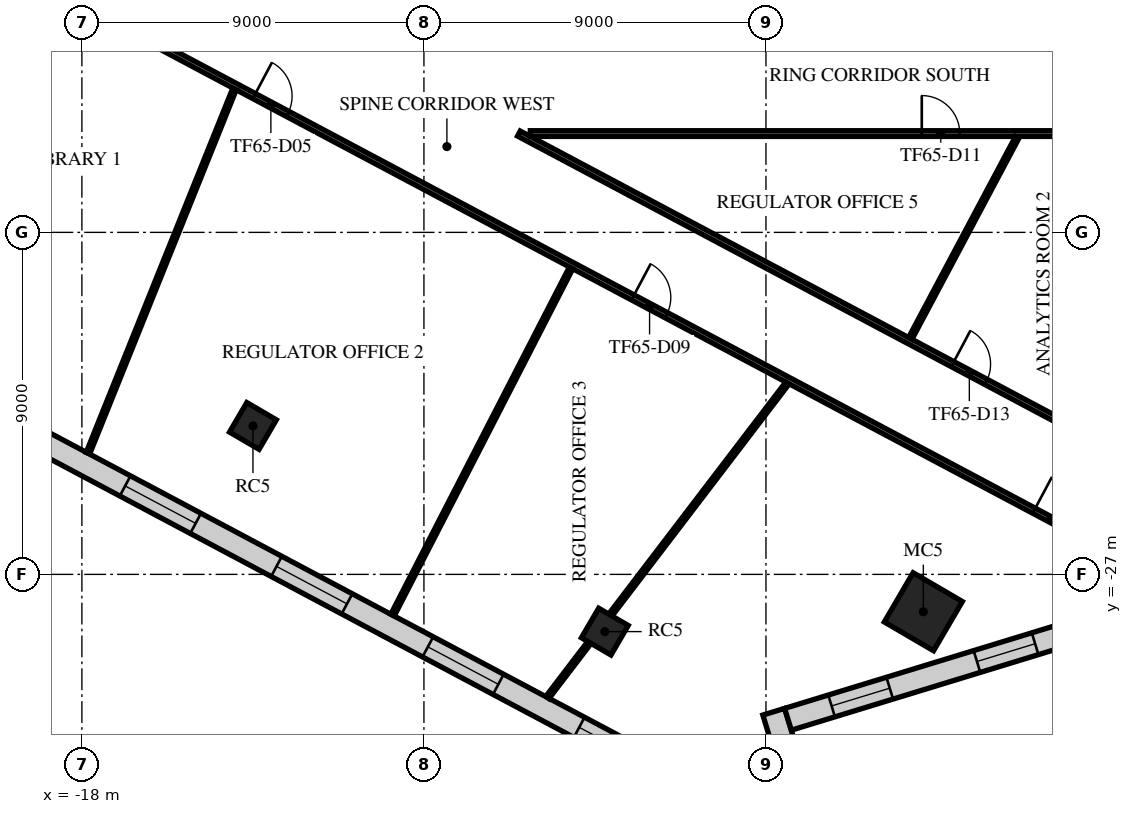
"""IFC4 building model, lengths in metres.
Left out: names, types, materials, properties, quantities, classifications, styles, units other than length and angle.
Written with IfcOpenShell. Run it as: python <this file> out.ifc"""

import sys

from ifc_helpers import new_model, si_unit, direction, frame, frame_2d, origin, origin_2d, place, context, subcontext, project, spatial, rectangle, extrude, element, fill, save


model = new_model("IFC4")
c1 = context("Model", 3, precision=1e-05, world=origin(), true_north=direction((0.0, 1.0)))
c2 = subcontext(c1, "Body", "Model", "MODEL_VIEW")
j1 = project(units=[si_unit("LENGTHUNIT", "METRE"), si_unit("PLANEANGLEUNIT", "RADIAN")], contexts=[c1])
p1 = place(None, origin())
s1 = spatial("IfcSite", under=j1, at=p1, CompositionType="ELEMENT")
p2 = place(p1, origin())
s2 = spatial("IfcBuilding", under=s1, at=p2, CompositionType="ELEMENT")
p3 = place(p2, frame((0.0, 0.0, 274.9)))
s3 = spatial("IfcBuildingStorey", under=s2, at=p3, CompositionType="ELEMENT", Elevation=274.9)
for number, where, z_axis, x_axis in (
    (1, (-13.499, -23.094, 0.0), (0.0, 0.0, 1.0), (0.505, 0.863, 0.0)),
    (2, (-4.24, -28.506, 0.0), (0.0, 0.0, 1.0), (0.505, 0.863, 0.0)),
):
    element("IfcColumn", number, at=place(p3, frame(where, z_axis=z_axis, x_axis=x_axis)), inside=s3, PredefinedType="COLUMN", context=c2, shape_type="SweptSolid", body=[
        extrude(rectangle(XDim=0.9, YDim=0.9, at=origin_2d()), origin(), (0.0, 0.0, 1.0), 4.0),
    ])
p4 = place(p3, frame((4.141, -27.983, 0.0), z_axis=(0.0, 0.0, 1.0), x_axis=(0.504643651291, 0.863327739165, 0.0)))
e3 = element("IfcColumn", 3, at=p4, inside=s3, PredefinedType="COLUMN", context=c2, shape_type="SweptSolid", body=[
    extrude(rectangle(XDim=1.5, YDim=1.5, at=origin_2d()), origin(), (0.0, 0.0, 1.0), 4.0),
])
p5 = place(p3, frame((-29.875, -17.753, 0.0), z_axis=(0.0, 0.0, 1.0), x_axis=(0.882945726539, -0.469475072806, 0.0)))
e4 = element("IfcWall", 4, at=p5, inside=s3, PredefinedType="STANDARD", context=c2, shape_type="SweptSolid", body=[
    extrude(rectangle(XDim=36.086, YDim=0.6, at=frame_2d((18.043, 0.0))), origin(), (0.0, 0.0, 1.0), 3.64),
])
p6 = place(p5, frame((1.205, 0.0, 0.9)))
e5 = element("IfcOpeningElement", 5, at=p6, cuts=e4, PredefinedType="OPENING", context=c2, shape_type="SweptSolid", body=[
    extrude(rectangle(XDim=2.1, YDim=2.1, at=frame_2d((1.05, 1.05))), frame((0.0, 0.31, 0.0), z_axis=(0.0, -1.0, 0.0), x_axis=(1.0, 0.0, 0.0)), (0.0, 0.0, 1.0), 0.62),
])
p7 = place(p5, frame((5.716, 0.0, 0.9)))
e6 = element("IfcOpeningElement", 6, at=p7, cuts=e4, PredefinedType="OPENING", context=c2, shape_type="SweptSolid", body=[
    extrude(rectangle(XDim=2.1, YDim=2.1, at=frame_2d((1.05, 1.05))), frame((0.0, 0.31, 0.0), z_axis=(0.0, -1.0, 0.0), x_axis=(1.0, 0.0, 0.0)), (0.0, 0.0, 1.0), 0.62),
])
p8 = place(p5, frame((10.227, 0.0, 0.9)))
e7 = element("IfcOpeningElement", 7, at=p8, cuts=e4, PredefinedType="OPENING", context=c2, shape_type="SweptSolid", body=[
    extrude(rectangle(XDim=2.1, YDim=2.1, at=frame_2d((1.05, 1.05))), frame((0.0, 0.31, 0.0), z_axis=(0.0, -1.0, 0.0), x_axis=(1.0, 0.0, 0.0)), (0.0, 0.0, 1.0), 0.62),
])
p9 = place(p5, frame((14.738, 0.0, 0.9)))
e8 = element("IfcOpeningElement", 8, at=p9, cuts=e4, PredefinedType="OPENING", context=c2, shape_type="SweptSolid", body=[
    extrude(rectangle(XDim=2.1, YDim=2.1, at=frame_2d((1.05, 1.05))), frame((0.0, 0.31, 0.0), z_axis=(0.0, -1.0, 0.0), x_axis=(1.0, 0.0, 0.0)), (0.0, 0.0, 1.0), 0.62),
])
p10 = place(p5, frame((19.249, 0.0, 0.9)))
e9 = element("IfcOpeningElement", 9, at=p10, cuts=e4, PredefinedType="OPENING", context=c2, shape_type="SweptSolid", body=[
    extrude(rectangle(XDim=2.1, YDim=2.1, at=frame_2d((1.05, 1.05))), frame((0.0, 0.31, 0.0), z_axis=(0.0, -1.0, 0.0), x_axis=(1.0, 0.0, 0.0)), (0.0, 0.0, 1.0), 0.62),
])
p11 = place(p5, frame((23.759, 0.0, 0.9)))
e10 = element("IfcOpeningElement", 10, at=p11, cuts=e4, PredefinedType="OPENING", context=c2, shape_type="SweptSolid", body=[
    extrude(rectangle(XDim=2.1, YDim=2.1, at=frame_2d((1.05, 1.05))), frame((0.0, 0.31, 0.0), z_axis=(0.0, -1.0, 0.0), x_axis=(1.0, 0.0, 0.0)), (0.0, 0.0, 1.0), 0.62),
])
p12 = place(p5, frame((28.27, 0.0, 0.9)))
e11 = element("IfcOpeningElement", 11, at=p12, cuts=e4, PredefinedType="OPENING", context=c2, shape_type="SweptSolid", body=[
    extrude(rectangle(XDim=2.1, YDim=2.1, at=frame_2d((1.05, 1.05))), frame((0.0, 0.31, 0.0), z_axis=(0.0, -1.0, 0.0), x_axis=(1.0, 0.0, 0.0)), (0.0, 0.0, 1.0), 0.62),
])
p13 = place(p5, frame((32.781, 0.0, 0.9)))
e12 = element("IfcOpeningElement", 12, at=p13, cuts=e4, PredefinedType="OPENING", context=c2, shape_type="SweptSolid", body=[
    extrude(rectangle(XDim=2.1, YDim=2.1, at=frame_2d((1.05, 1.05))), frame((0.0, 0.31, 0.0), z_axis=(0.0, -1.0, 0.0), x_axis=(1.0, 0.0, 0.0)), (0.0, 0.0, 1.0), 0.62),
])
p14 = place(p3, frame((1.56, -35.047, 0.0), z_axis=(0.0, 0.0, 1.0), x_axis=(-0.2923643842, 0.956306994041, 0.0)))
e13 = element("IfcWall", 13, at=p14, inside=s3, PredefinedType="STANDARD", context=c2, shape_type="SweptSolid", body=[
    extrude(rectangle(XDim=4.635, YDim=0.6, at=frame_2d((2.318, 0.0))), origin(), (0.0, 0.0, 1.0), 3.64),
])
p15 = place(p14, frame((1.218, 0.0, 0.9)))
e14 = element("IfcOpeningElement", 14, at=p15, cuts=e13, PredefinedType="OPENING", context=c2, shape_type="SweptSolid", body=[
    extrude(rectangle(XDim=1.6, YDim=2.1, at=frame_2d((0.8, 1.05))), frame((0.0, 0.31, 0.0), z_axis=(0.0, -1.0, 0.0), x_axis=(1.0, 0.0, 0.0)), (0.0, 0.0, 1.0), 0.62),
])
p16 = place(p3, frame((0.579, -30.813, 0.0), z_axis=(0.0, 0.0, 1.0), x_axis=(0.95631057801, 0.292352660987, 0.0)))
e15 = element("IfcWall", 15, at=p16, inside=s3, PredefinedType="STANDARD", context=c2, shape_type="SweptSolid", body=[
    extrude(rectangle(XDim=8.0, YDim=0.6, at=frame_2d((4.0, 0.0))), origin(), (0.0, 0.0, 1.0), 3.64),
])
p17 = place(p16, frame((1.2, 0.0, 0.9)))
e16 = element("IfcOpeningElement", 16, at=p17, cuts=e15, PredefinedType="OPENING", context=c2, shape_type="SweptSolid", body=[
    extrude(rectangle(XDim=1.6, YDim=2.1, at=frame_2d((0.8, 1.05))), frame((0.0, 0.31, 0.0), z_axis=(0.0, -1.0, 0.0), x_axis=(1.0, 0.0, 0.0)), (0.0, 0.0, 1.0), 0.62),
])
p18 = place(p16, frame((5.2, 0.0, 0.9)))
e17 = element("IfcOpeningElement", 17, at=p18, cuts=e15, PredefinedType="OPENING", context=c2, shape_type="SweptSolid", body=[
    extrude(rectangle(XDim=1.6, YDim=2.1, at=frame_2d((0.8, 1.05))), frame((0.0, 0.31, 0.0), z_axis=(0.0, -1.0, 0.0), x_axis=(1.0, 0.0, 0.0)), (0.0, 0.0, 1.0), 0.62),
])
p19 = place(p3, frame((-26.271, -7.606, 0.0), z_axis=(0.0, 0.0, 1.0), x_axis=(0.882946860375, -0.469472940385, 0.0)))
e18 = element("IfcWall", 18, at=p19, inside=s3, PredefinedType="PARTITIONING", context=c2, shape_type="SweptSolid", body=[
    extrude(rectangle(XDim=39.325, YDim=0.15, at=frame_2d((19.662, 0.0))), origin(), (0.0, 0.0, 1.0), 3.04),
])
p20 = place(p19, frame((2.8, 0.0, 0.0)))
e19 = element("IfcOpeningElement", 19, at=p20, cuts=e18, PredefinedType="OPENING", context=c2, shape_type="SweptSolid", body=[
    extrude(rectangle(XDim=1.0, YDim=2.1, at=frame_2d((0.5, 1.05))), frame((0.0, 0.085, 0.0), z_axis=(0.0, -1.0, 0.0), x_axis=(1.0, 0.0, 0.0)), (0.0, 0.0, 1.0), 0.17),
])
p21 = place(p19, frame((6.915, 0.0, 0.0)))
e20 = element("IfcOpeningElement", 20, at=p21, cuts=e18, PredefinedType="OPENING", context=c2, shape_type="SweptSolid", body=[
    extrude(rectangle(XDim=1.0, YDim=2.1, at=frame_2d((0.5, 1.05))), frame((0.0, 0.085, 0.0), z_axis=(0.0, -1.0, 0.0), x_axis=(1.0, 0.0, 0.0)), (0.0, 0.0, 1.0), 0.17),
])
p22 = place(p19, frame((14.499, 0.0, 0.0)))
e21 = element("IfcOpeningElement", 21, at=p22, cuts=e18, PredefinedType="OPENING", context=c2, shape_type="SweptSolid", body=[
    extrude(rectangle(XDim=1.0, YDim=2.1, at=frame_2d((0.5, 1.05))), frame((0.0, 0.085, 0.0), z_axis=(0.0, -1.0, 0.0), x_axis=(1.0, 0.0, 0.0)), (0.0, 0.0, 1.0), 0.17),
])
p23 = place(p19, frame((25.785, 0.0, 0.0)))
e22 = element("IfcOpeningElement", 22, at=p23, cuts=e18, PredefinedType="OPENING", context=c2, shape_type="SweptSolid", body=[
    extrude(rectangle(XDim=1.0, YDim=2.1, at=frame_2d((0.5, 1.05))), frame((0.0, 0.085, 0.0), z_axis=(0.0, -1.0, 0.0), x_axis=(1.0, 0.0, 0.0)), (0.0, 0.0, 1.0), 0.17),
])
p24 = place(p19, frame((37.741, 0.0, 0.0)))
e23 = element("IfcOpeningElement", 23, at=p24, cuts=e18, PredefinedType="OPENING", context=c2, shape_type="SweptSolid", body=[
    extrude(rectangle(XDim=1.0, YDim=2.1, at=frame_2d((0.5, 1.05))), frame((0.0, 0.085, 0.0), z_axis=(0.0, -1.0, 0.0), x_axis=(1.0, 0.0, 0.0)), (0.0, 0.0, 1.0), 0.17),
])
p25 = place(p3, frame((-6.501, -15.4, 0.0), z_axis=(0.0, 0.0, 1.0), x_axis=(0.882952324659, -0.469462663456, 0.0)))
e24 = element("IfcWall", 24, at=p25, inside=s3, PredefinedType="PARTITIONING", context=c2, shape_type="SweptSolid", body=[
    extrude(rectangle(XDim=18.21, YDim=0.15, at=frame_2d((9.105, 0.0))), origin(), (0.0, 0.0, 1.0), 3.04),
])
p26 = place(p25, frame((12.924, 0.0, 0.0)))
e25 = element("IfcOpeningElement", 25, at=p26, cuts=e24, PredefinedType="OPENING", context=c2, shape_type="SweptSolid", body=[
    extrude(rectangle(XDim=1.0, YDim=2.1, at=frame_2d((0.5, 1.05))), frame((0.0, 0.085, 0.0), z_axis=(0.0, -1.0, 0.0), x_axis=(1.0, 0.0, 0.0)), (0.0, 0.0, 1.0), 0.17),
])
p27 = place(p3, frame((-6.2, -15.4, 0.0), z_axis=(0.0, 0.0, 1.0), x_axis=(1.0, 0.0, 0.0)))
e26 = element("IfcWall", 26, at=p27, inside=s3, PredefinedType="PARTITIONING", context=c2, shape_type="SweptSolid", body=[
    extrude(rectangle(XDim=21.6, YDim=0.15, at=frame_2d((10.8, 0.0))), origin(), (0.0, 0.0, 1.0), 3.24),
])
p28 = place(p27, frame((10.3, 0.0, 0.0)))
e27 = element("IfcOpeningElement", 27, at=p28, cuts=e26, PredefinedType="OPENING", context=c2, shape_type="SweptSolid", body=[
    extrude(rectangle(XDim=1.0, YDim=2.1, at=frame_2d((0.5, 1.05))), frame((0.0, 0.085, 0.0), z_axis=(0.0, -1.0, 0.0), x_axis=(1.0, 0.0, 0.0)), (0.0, 0.0, 1.0), 0.17),
])
p29 = place(p3, frame((-17.84, -23.81, 0.0), z_axis=(0.0, 0.0, 1.0), x_axis=(0.373322071297, 0.927701800732, 0.0)))
e28 = element("IfcWall", 28, at=p29, inside=s3, PredefinedType="PARTITIONING", context=c2, shape_type="SweptSolid", body=[
    extrude(rectangle(XDim=10.326, YDim=0.1, at=frame_2d((5.163, 0.0))), origin(), (0.0, 0.0, 1.0), 3.04),
])
p30 = place(p3, frame((-9.826, -28.071, 0.0), z_axis=(0.0, 0.0, 1.0), x_axis=(0.457289483917, 0.889317900359, 0.0)))
e29 = element("IfcWall", 29, at=p30, inside=s3, PredefinedType="PARTITIONING", context=c2, shape_type="SweptSolid", body=[
    extrude(rectangle(XDim=10.274, YDim=0.1, at=frame_2d((5.137, 0.0))), origin(), (0.0, 0.0, 1.0), 3.04),
])
p31 = place(p3, frame((-5.75, -30.238, 0.0), z_axis=(0.0, 0.0, 1.0), x_axis=(0.60662872898, 0.794985273559, 0.0)))
e30 = element("IfcWall", 30, at=p31, inside=s3, PredefinedType="PARTITIONING", context=c2, shape_type="SweptSolid", body=[
    extrude(rectangle(XDim=1.821, YDim=0.1, at=frame_2d((0.911, 0.0))), origin(), (0.0, 0.0, 1.0), 3.64),
])
p32 = place(p3, frame((-4.095, -28.07, 0.0), z_axis=(0.0, 0.0, 1.0), x_axis=(0.606675434914, 0.794949631532, 0.0)))
e31 = element("IfcWall", 31, at=p32, inside=s3, PredefinedType="PARTITIONING", context=c2, shape_type="SweptSolid", body=[
    extrude(rectangle(XDim=7.677, YDim=0.1, at=frame_2d((3.838, 0.0))), origin(), (0.0, 0.0, 1.0), 3.24),
])
p33 = place(p3, frame((3.797, -20.791, 0.0), z_axis=(0.0, 0.0, 1.0), x_axis=(0.469539343426, 0.882911549916, 0.0)))
e32 = element("IfcWall", 32, at=p33, inside=s3, PredefinedType="PARTITIONING", context=c2, shape_type="SweptSolid", body=[
    extrude(rectangle(XDim=5.994, YDim=0.1, at=frame_2d((2.997, 0.0))), origin(), (0.0, 0.0, 1.0), 3.24),
])
p34 = place(p9, origin())
e33 = element("IfcWindow", 33, at=p34, inside=s3, PartitioningType="SINGLE_PANEL", PredefinedType="WINDOW", context=c2, shape_type="SweptSolid", body=[
    extrude(rectangle(XDim=2.1, YDim=2.1, at=frame_2d((1.05, 1.05))), frame((0.0, 0.03, 0.0), z_axis=(0.0, -1.0, 0.0), x_axis=(1.0, 0.0, 0.0)), (0.0, 0.0, 1.0), 0.06),
])
fill(e8, e33)
p35 = place(p10, origin())
e34 = element("IfcWindow", 34, at=p35, inside=s3, PartitioningType="SINGLE_PANEL", PredefinedType="WINDOW", context=c2, shape_type="SweptSolid", body=[
    extrude(rectangle(XDim=2.1, YDim=2.1, at=frame_2d((1.05, 1.05))), frame((0.0, 0.03, 0.0), z_axis=(0.0, -1.0, 0.0), x_axis=(1.0, 0.0, 0.0)), (0.0, 0.0, 1.0), 0.06),
])
fill(e9, e34)
p36 = place(p11, origin())
e35 = element("IfcWindow", 35, at=p36, inside=s3, PartitioningType="SINGLE_PANEL", PredefinedType="WINDOW", context=c2, shape_type="SweptSolid", body=[
    extrude(rectangle(XDim=2.1, YDim=2.1, at=frame_2d((1.05, 1.05))), frame((0.0, 0.03, 0.0), z_axis=(0.0, -1.0, 0.0), x_axis=(1.0, 0.0, 0.0)), (0.0, 0.0, 1.0), 0.06),
])
fill(e10, e35)
p37 = place(p12, origin())
e36 = element("IfcWindow", 36, at=p37, inside=s3, PartitioningType="SINGLE_PANEL", PredefinedType="WINDOW", context=c2, shape_type="SweptSolid", body=[
    extrude(rectangle(XDim=2.1, YDim=2.1, at=frame_2d((1.05, 1.05))), frame((0.0, 0.03, 0.0), z_axis=(0.0, -1.0, 0.0), x_axis=(1.0, 0.0, 0.0)), (0.0, 0.0, 1.0), 0.06),
])
fill(e11, e36)
p38 = place(p17, origin())
e37 = element("IfcWindow", 37, at=p38, inside=s3, PartitioningType="SINGLE_PANEL", PredefinedType="WINDOW", context=c2, shape_type="SweptSolid", body=[
    extrude(rectangle(XDim=1.6, YDim=2.1, at=frame_2d((0.8, 1.05))), frame((0.0, 0.03, 0.0), z_axis=(0.0, -1.0, 0.0), x_axis=(1.0, 0.0, 0.0)), (0.0, 0.0, 1.0), 0.06),
])
fill(e16, e37)
p39 = place(p18, origin())
e38 = element("IfcWindow", 38, at=p39, inside=s3, PartitioningType="SINGLE_PANEL", PredefinedType="WINDOW", context=c2, shape_type="SweptSolid", body=[
    extrude(rectangle(XDim=1.6, YDim=2.1, at=frame_2d((0.8, 1.05))), frame((0.0, 0.03, 0.0), z_axis=(0.0, -1.0, 0.0), x_axis=(1.0, 0.0, 0.0)), (0.0, 0.0, 1.0), 0.06),
])
fill(e17, e38)
p40 = place(p22, frame((1.0, 0.0, 0.0), z_axis=(0.0, 0.0, 1.0), x_axis=(-1.0, 0.0, 0.0)))
e39 = element("IfcDoor", 39, at=p40, inside=s3, OperationType="SINGLE_SWING_RIGHT", PredefinedType="DOOR", context=c2, shape_type="SweptSolid", body=[
    extrude(rectangle(XDim=1.0, YDim=2.1, at=frame_2d((0.5, 1.05))), frame((0.0, 0.025, 0.0), z_axis=(0.0, -1.0, 0.0), x_axis=(1.0, 0.0, 0.0)), (0.0, 0.0, 1.0), 0.05),
])
fill(e21, e39)
p41 = place(p23, frame((1.0, 0.0, 0.0), z_axis=(0.0, 0.0, 1.0), x_axis=(-1.0, 0.0, 0.0)))
e40 = element("IfcDoor", 40, at=p41, inside=s3, OperationType="SINGLE_SWING_LEFT", PredefinedType="DOOR", context=c2, shape_type="SweptSolid", body=[
    extrude(rectangle(XDim=1.0, YDim=2.1, at=frame_2d((0.5, 1.05))), frame((0.0, 0.025, 0.0), z_axis=(0.0, -1.0, 0.0), x_axis=(1.0, 0.0, 0.0)), (0.0, 0.0, 1.0), 0.05),
])
fill(e22, e40)
p42 = place(p28, frame((1.0, 0.0, 0.0), z_axis=(0.0, 0.0, 1.0), x_axis=(-1.0, 0.0, 0.0)))
e41 = element("IfcDoor", 41, at=p42, inside=s3, OperationType="SINGLE_SWING_LEFT", PredefinedType="DOOR", context=c2, shape_type="SweptSolid", body=[
    extrude(rectangle(XDim=1.0, YDim=2.1, at=frame_2d((0.5, 1.05))), frame((0.0, 0.025, 0.0), z_axis=(0.0, -1.0, 0.0), x_axis=(1.0, 0.0, 0.0)), (0.0, 0.0, 1.0), 0.05),
])
fill(e27, e41)
p43 = place(p26, origin())
e42 = element("IfcDoor", 42, at=p43, inside=s3, OperationType="SINGLE_SWING_RIGHT", PredefinedType="DOOR", context=c2, shape_type="SweptSolid", body=[
    extrude(rectangle(XDim=1.0, YDim=2.1, at=frame_2d((0.5, 1.05))), frame((0.0, 0.025, 0.0), z_axis=(0.0, -1.0, 0.0), x_axis=(1.0, 0.0, 0.0)), (0.0, 0.0, 1.0), 0.05),
])
fill(e25, e42)
p44 = place(p24, frame((1.0, 0.0, 0.0), z_axis=(0.0, 0.0, 1.0), x_axis=(-1.0, 0.0, 0.0)))
e43 = element("IfcDoor", 43, at=p44, inside=s3, OperationType="SINGLE_SWING_LEFT", PredefinedType="DOOR", context=c2, shape_type="SweptSolid", body=[
    extrude(rectangle(XDim=1.0, YDim=2.1, at=frame_2d((0.5, 1.05))), frame((0.0, 0.025, 0.0), z_axis=(0.0, -1.0, 0.0), x_axis=(1.0, 0.0, 0.0)), (0.0, 0.0, 1.0), 0.05),
])
fill(e23, e43)
save(model, sys.argv[1])
